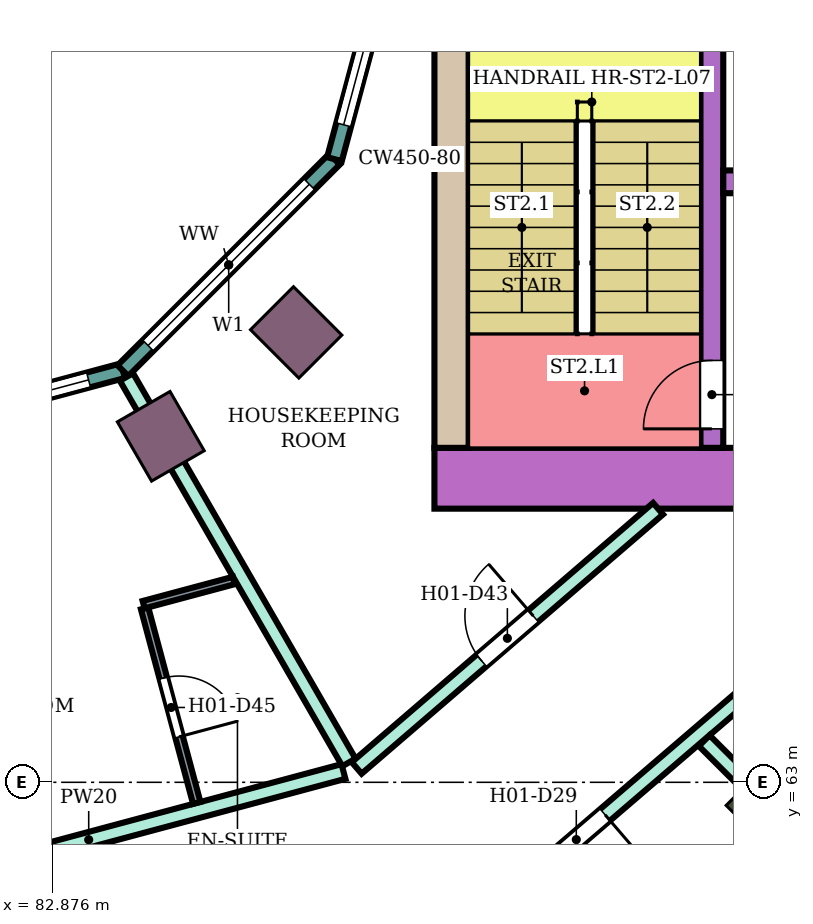
"""IFC4 building model, lengths in metres.
Left out: names, types, materials, properties, quantities, classifications, styles, units other than length and angle.
Written with IfcOpenShell. Run it as: python <this file> out.ifc"""

import sys

from ifc_helpers import new_model, si_unit, direction, frame, frame_2d, origin, origin_2d, place, context, subcontext, project, spatial, rectangle, extrude, element, fill, save


model = new_model("IFC4")
c1 = context("Model", 3, precision=1e-05, world=origin(), true_north=direction((0.0, 1.0)))
c2 = subcontext(c1, "Body", "Model", "MODEL_VIEW")
j1 = project(units=[si_unit("LENGTHUNIT", "METRE"), si_unit("PLANEANGLEUNIT", "RADIAN")], contexts=[c1])
p1 = place(None, origin())
s1 = spatial("IfcSite", under=j1, at=p1, CompositionType="ELEMENT")
p2 = place(p1, origin())
s2 = spatial("IfcBuilding", under=s1, at=p2, CompositionType="ELEMENT")
p3 = place(p2, frame((0.0, 0.0, 36.4)))
s3 = spatial("IfcBuildingStorey", under=s2, at=p3, CompositionType="ELEMENT", Elevation=36.4)
p4 = place(p3, frame((92.445, 62.555, 0.0), z_axis=(0.0, 0.0, 1.0), x_axis=(0.707106781187, -0.707106781187, 0.0)))
e1 = element("IfcColumn", 1, at=p4, inside=s3, PredefinedType="COLUMN", context=c2, shape_type="SweptSolid", body=[
    extrude(rectangle(XDim=1.2, YDim=0.8, at=origin_2d()), origin(), (0.0, 0.0, 1.0), 3.8),
])
for number, where, z_axis, x_axis in (
    (2, (84.3, 67.552, 0.0), (0.0, 0.0, 1.0), (0.5, -0.866, 0.0)),
    (3, (86.081, 68.919, 0.0), (0.0, 0.0, 1.0), (0.707, -0.707, 0.0)),
):
    element("IfcColumn", number, at=place(p3, frame(where, z_axis=z_axis, x_axis=x_axis)), inside=s3, PredefinedType="COLUMN", context=c2, shape_type="SweptSolid", body=[
        extrude(rectangle(XDim=0.9, YDim=0.8, at=origin_2d()), origin(), (0.0, 0.0, 1.0), 3.8),
    ])
p5 = place(p3, frame((87.9, 67.0, 0.0), z_axis=(0.0, 0.0, 1.0), x_axis=(1.0, 0.0, 0.0)))
e4 = element("IfcWall", 4, at=p5, inside=s3, PredefinedType="SHEAR", context=c2, shape_type="SweptSolid", body=[
    extrude(rectangle(XDim=14.7, YDim=0.8, at=frame_2d((7.35, 0.0))), origin(), (0.0, 0.0, 1.0), 3.48),
])
p6 = place(p5, frame((4.2, 0.0, 0.0)))
e5 = element("IfcOpeningElement", 5, at=p6, cuts=e4, PredefinedType="OPENING", context=c2, shape_type="SweptSolid", body=[
    extrude(rectangle(XDim=2.4, YDim=2.4, at=frame_2d((1.2, 1.2))), frame((0.0, 0.41, 0.0), z_axis=(0.0, -1.0, 0.0), x_axis=(1.0, 0.0, 0.0)), (0.0, 0.0, 1.0), 0.82),
])
p7 = place(p3, frame((88.125, 67.4, 0.0), z_axis=(0.0, 0.0, 1.0), x_axis=(0.0, 1.0, 0.0)))
e6 = element("IfcWall", 6, at=p7, inside=s3, PredefinedType="SHEAR", context=c2, shape_type="SweptSolid", body=[
    extrude(rectangle(XDim=7.6, YDim=0.45, at=frame_2d((3.8, 0.0))), origin(), (0.0, 0.0, 1.0), 3.48),
])
p8 = place(p3, frame((91.55, 67.4, 0.0), z_axis=(0.0, 0.0, 1.0), x_axis=(0.0, 1.0, 0.0)))
e7 = element("IfcWall", 7, at=p8, inside=s3, PredefinedType="SHEAR", context=c2, shape_type="SweptSolid", body=[
    extrude(rectangle(XDim=7.6, YDim=0.3, at=frame_2d((3.8, 0.0))), origin(), (0.0, 0.0, 1.0), 3.48),
])
p9 = place(p8, frame((0.25, 0.0, 0.0)))
e8 = element("IfcOpeningElement", 8, at=p9, cuts=e7, PredefinedType="OPENING", context=c2, shape_type="SweptSolid", body=[
    extrude(rectangle(XDim=0.9, YDim=2.1, at=frame_2d((0.45, 1.05))), frame((0.0, 0.16, 0.0), z_axis=(0.0, -1.0, 0.0), x_axis=(1.0, 0.0, 0.0)), (0.0, 0.0, 1.0), 0.32),
])
p10 = place(p3, frame((91.7, 70.9, 0.0), z_axis=(0.0, 0.0, 1.0), x_axis=(1.0, 0.0, 0.0)))
e9 = element("IfcWall", 9, at=p10, inside=s3, PredefinedType="SHEAR", context=c2, shape_type="SweptSolid", body=[
    extrude(rectangle(XDim=10.9, YDim=0.3, at=frame_2d((5.45, 0.0))), origin(), (0.0, 0.0, 1.0), 3.48),
])
p11 = place(p10, frame((0.4, 0.0, 0.0)))
e10 = element("IfcOpeningElement", 10, at=p11, cuts=e9, PredefinedType="OPENING", context=c2, shape_type="SweptSolid", body=[
    extrude(rectangle(XDim=1.4, YDim=2.1, at=frame_2d((0.7, 1.05))), frame((0.0, 0.16, 0.0), z_axis=(0.0, -1.0, 0.0), x_axis=(1.0, 0.0, 0.0)), (0.0, 0.0, 1.0), 0.32),
])
p12 = place(p10, frame((5.4, 0.0, 0.0)))
e11 = element("IfcOpeningElement", 11, at=p12, cuts=e9, PredefinedType="OPENING", context=c2, shape_type="SweptSolid", body=[
    extrude(rectangle(XDim=1.4, YDim=2.1, at=frame_2d((0.7, 1.05))), frame((0.0, 0.16, 0.0), z_axis=(0.0, -1.0, 0.0), x_axis=(1.0, 0.0, 0.0)), (0.0, 0.0, 1.0), 0.32),
])
p13 = place(p10, frame((8.1, 0.0, 0.0)))
e12 = element("IfcOpeningElement", 12, at=p13, cuts=e9, PredefinedType="OPENING", context=c2, shape_type="SweptSolid", body=[
    extrude(rectangle(XDim=1.0, YDim=2.1, at=frame_2d((0.5, 1.05))), frame((0.0, 0.16, 0.0), z_axis=(0.0, -1.0, 0.0), x_axis=(1.0, 0.0, 0.0)), (0.0, 0.0, 1.0), 0.32),
])
p14 = place(p3, frame((80.0, 67.396, 0.0), z_axis=(0.0, 0.0, 1.0), x_axis=(0.965933654434, 0.258789828301, 0.0)))
e13 = element("IfcWall", 13, at=p14, inside=s3, PredefinedType="NOTDEFINED", context=c2, shape_type="SweptSolid", body=[
    extrude(rectangle(XDim=3.936, YDim=0.2, at=frame_2d((1.968, 0.0))), origin(), (0.0, 0.0, 1.0), 3.8),
])
p15 = place(p14, frame((0.468, 0.0, 0.9)))
e14 = element("IfcOpeningElement", 14, at=p15, cuts=e13, PredefinedType="OPENING", context=c2, shape_type="SweptSolid", body=[
    extrude(rectangle(XDim=3.0, YDim=2.3, at=frame_2d((1.5, 1.15))), frame((0.0, 0.11, 0.0), z_axis=(0.0, -1.0, 0.0), x_axis=(1.0, 0.0, 0.0)), (0.0, 0.0, 1.0), 0.22),
])
p16 = place(p3, frame((83.802, 68.415, 0.0), z_axis=(0.0, 0.0, 1.0), x_axis=(0.707106781187, 0.707106781187, 0.0)))
e15 = element("IfcWall", 15, at=p16, inside=s3, PredefinedType="NOTDEFINED", context=c2, shape_type="SweptSolid", body=[
    extrude(rectangle(XDim=3.936, YDim=0.2, at=frame_2d((1.968, 0.0))), origin(), (0.0, 0.0, 1.0), 3.8),
])
p17 = place(p16, frame((0.468, 0.0, 0.9)))
e16 = element("IfcOpeningElement", 16, at=p17, cuts=e15, PredefinedType="OPENING", context=c2, shape_type="SweptSolid", body=[
    extrude(rectangle(XDim=3.0, YDim=2.3, at=frame_2d((1.5, 1.15))), frame((0.0, 0.11, 0.0), z_axis=(0.0, -1.0, 0.0), x_axis=(1.0, 0.0, 0.0)), (0.0, 0.0, 1.0), 0.22),
])
p18 = place(p3, frame((86.585, 71.198, 0.0), z_axis=(0.0, 0.0, 1.0), x_axis=(0.258789828301, 0.965933654434, 0.0)))
e17 = element("IfcWall", 17, at=p18, inside=s3, PredefinedType="NOTDEFINED", context=c2, shape_type="SweptSolid", body=[
    extrude(rectangle(XDim=3.936, YDim=0.2, at=frame_2d((1.968, 0.0))), origin(), (0.0, 0.0, 1.0), 3.8),
])
p19 = place(p18, frame((0.468, 0.0, 0.9)))
e18 = element("IfcOpeningElement", 18, at=p19, cuts=e17, PredefinedType="OPENING", context=c2, shape_type="SweptSolid", body=[
    extrude(rectangle(XDim=3.0, YDim=2.3, at=frame_2d((1.5, 1.15))), frame((0.0, 0.11, 0.0), z_axis=(0.0, -1.0, 0.0), x_axis=(1.0, 0.0, 0.0)), (0.0, 0.0, 1.0), 0.22),
])
p20 = place(p3, frame((80.0, 61.346, 0.0), z_axis=(0.0, 0.0, 1.0), x_axis=(0.965924181808, 0.258825182312, 0.0)))
e19 = element("IfcWall", 19, at=p20, inside=s3, PredefinedType="PARTITIONING", context=c2, shape_type="SweptSolid", body=[
    extrude(rectangle(XDim=6.94, YDim=0.2, at=frame_2d((3.47, 0.0))), origin(), (0.0, 0.0, 1.0), 3.35),
])
p21 = place(p20, frame((0.55, 0.0, 0.0)))
e20 = element("IfcOpeningElement", 20, at=p21, cuts=e19, PredefinedType="OPENING", context=c2, shape_type="SweptSolid", body=[
    extrude(rectangle(XDim=1.0, YDim=2.1, at=frame_2d((0.5, 1.05))), frame((0.0, 0.11, 0.0), z_axis=(0.0, -1.0, 0.0), x_axis=(1.0, 0.0, 0.0)), (0.0, 0.0, 1.0), 0.22),
])
p22 = place(p3, frame((83.848, 68.333, 0.0), z_axis=(0.0, 0.0, 1.0), x_axis=(0.499951054106, -0.866053660865, 0.0)))
e21 = element("IfcWall", 21, at=p22, inside=s3, PredefinedType="PARTITIONING", context=c2, shape_type="SweptSolid", body=[
    extrude(rectangle(XDim=5.855, YDim=0.2, at=frame_2d((2.927, 0.0))), origin(), (0.0, 0.0, 1.0), 3.35),
])
p23 = place(p3, frame((86.877, 63.189, 0.0), z_axis=(0.0, 0.0, 1.0), x_axis=(0.758075808328, 0.652166442581, 0.0)))
e22 = element("IfcWall", 22, at=p23, inside=s3, PredefinedType="PARTITIONING", context=c2, shape_type="SweptSolid", body=[
    extrude(rectangle(XDim=5.23, YDim=0.2, at=frame_2d((2.615, 0.0))), origin(), (0.0, 0.0, 1.0), 3.35),
])
p24 = place(p23, frame((2.165, 0.0, 0.0)))
e23 = element("IfcOpeningElement", 23, at=p24, cuts=e22, PredefinedType="OPENING", context=c2, shape_type="SweptSolid", body=[
    extrude(rectangle(XDim=0.9, YDim=2.1, at=frame_2d((0.45, 1.05))), frame((0.0, 0.11, 0.0), z_axis=(0.0, -1.0, 0.0), x_axis=(1.0, 0.0, 0.0)), (0.0, 0.0, 1.0), 0.22),
])
p25 = place(p3, frame((88.235, 60.931, 0.0), z_axis=(0.0, 0.0, 1.0), x_axis=(0.758799498714, 0.651324282329, 0.0)))
e24 = element("IfcWall", 24, at=p25, inside=s3, PredefinedType="PARTITIONING", context=c2, shape_type="SweptSolid", body=[
    extrude(rectangle(XDim=6.186, YDim=0.2, at=frame_2d((3.093, 0.0))), origin(), (0.0, 0.0, 1.0), 3.35),
])
p26 = place(p25, frame((1.519, 0.0, 0.0)))
e25 = element("IfcOpeningElement", 25, at=p26, cuts=e24, PredefinedType="OPENING", context=c2, shape_type="SweptSolid", body=[
    extrude(rectangle(XDim=1.0, YDim=2.1, at=frame_2d((0.5, 1.05))), frame((0.0, 0.11, 0.0), z_axis=(0.0, -1.0, 0.0), x_axis=(1.0, 0.0, 0.0)), (0.0, 0.0, 1.0), 0.22),
])
p27 = place(p3, frame((91.449, 63.548, 0.0), z_axis=(0.0, 0.0, 1.0), x_axis=(0.706984804638, -0.707228736698, 0.0)))
e26 = element("IfcWall", 26, at=p27, inside=s3, PredefinedType="PARTITIONING", context=c2, shape_type="SweptSolid", body=[
    extrude(rectangle(XDim=7.006, YDim=0.2, at=frame_2d((3.503, 0.0))), origin(), (0.0, 0.0, 1.0), 3.35),
])
p28 = place(p3, frame((84.087, 65.289, 0.0), z_axis=(0.0, 0.0, 1.0), x_axis=(0.258929459649, -0.965896234037, 0.0)))
e27 = element("IfcWall", 27, at=p28, inside=s3, PredefinedType="PARTITIONING", context=c2, shape_type="SweptSolid", body=[
    extrude(rectangle(XDim=2.65, YDim=0.1, at=frame_2d((1.325, 0.0))), origin(), (0.0, 0.0, 1.0), 3.35),
])
p29 = place(p28, frame((0.95, 0.0, 0.0)))
e28 = element("IfcOpeningElement", 28, at=p29, cuts=e27, PredefinedType="OPENING", context=c2, shape_type="SweptSolid", body=[
    extrude(rectangle(XDim=0.8, YDim=2.1, at=frame_2d((0.4, 1.05))), frame((0.0, 0.06, 0.0), z_axis=(0.0, -1.0, 0.0), x_axis=(1.0, 0.0, 0.0)), (0.0, 0.0, 1.0), 0.12),
])
p30 = place(p3, frame((84.074, 65.337, 0.0), z_axis=(0.0, 0.0, 1.0), x_axis=(0.965914351064, 0.258861867428, 0.0)))
e29 = element("IfcWall", 29, at=p30, inside=s3, PredefinedType="PARTITIONING", context=c2, shape_type="SweptSolid", body=[
    extrude(rectangle(XDim=1.229, YDim=0.1, at=frame_2d((0.615, 0.0))), origin(), (0.0, 0.0, 1.0), 3.35),
])
p31 = place(p15, origin())
e30 = element("IfcWindow", 30, at=p31, inside=s3, PartitioningType="SINGLE_PANEL", PredefinedType="WINDOW", context=c2, shape_type="SweptSolid", body=[
    extrude(rectangle(XDim=3.0, YDim=2.3, at=frame_2d((1.5, 1.15))), frame((0.0, 0.03, 0.0), z_axis=(0.0, -1.0, 0.0), x_axis=(1.0, 0.0, 0.0)), (0.0, 0.0, 1.0), 0.06),
])
fill(e14, e30)
p32 = place(p17, origin())
e31 = element("IfcWindow", 31, at=p32, inside=s3, PartitioningType="SINGLE_PANEL", PredefinedType="WINDOW", context=c2, shape_type="SweptSolid", body=[
    extrude(rectangle(XDim=3.0, YDim=2.3, at=frame_2d((1.5, 1.15))), frame((0.0, 0.03, 0.0), z_axis=(0.0, -1.0, 0.0), x_axis=(1.0, 0.0, 0.0)), (0.0, 0.0, 1.0), 0.06),
])
fill(e16, e31)
p33 = place(p19, origin())
e32 = element("IfcWindow", 32, at=p33, inside=s3, PartitioningType="SINGLE_PANEL", PredefinedType="WINDOW", context=c2, shape_type="SweptSolid", body=[
    extrude(rectangle(XDim=3.0, YDim=2.3, at=frame_2d((1.5, 1.15))), frame((0.0, 0.03, 0.0), z_axis=(0.0, -1.0, 0.0), x_axis=(1.0, 0.0, 0.0)), (0.0, 0.0, 1.0), 0.06),
])
fill(e18, e32)
p34 = place(p26, frame((1.0, 0.0, 0.0), z_axis=(0.0, 0.0, 1.0), x_axis=(-1.0, 0.0, 0.0)))
e33 = element("IfcDoor", 33, at=p34, inside=s3, OperationType="SINGLE_SWING_LEFT", PredefinedType="DOOR", context=c2, shape_type="SweptSolid", body=[
    extrude(rectangle(XDim=1.0, YDim=2.1, at=frame_2d((0.5, 1.05))), frame((0.0, 0.025, 0.0), z_axis=(0.0, -1.0, 0.0), x_axis=(1.0, 0.0, 0.0)), (0.0, 0.0, 1.0), 0.05),
])
fill(e25, e33)
p35 = place(p24, origin())
e34 = element("IfcDoor", 34, at=p35, inside=s3, OperationType="SINGLE_SWING_RIGHT", PredefinedType="DOOR", context=c2, shape_type="SweptSolid", body=[
    extrude(rectangle(XDim=0.9, YDim=2.1, at=frame_2d((0.45, 1.05))), frame((0.0, 0.025, 0.0), z_axis=(0.0, -1.0, 0.0), x_axis=(1.0, 0.0, 0.0)), (0.0, 0.0, 1.0), 0.05),
])
fill(e23, e34)
p36 = place(p29, origin())
e35 = element("IfcDoor", 35, at=p36, inside=s3, OperationType="SINGLE_SWING_RIGHT", PredefinedType="DOOR", context=c2, shape_type="SweptSolid", body=[
    extrude(rectangle(XDim=0.8, YDim=2.1, at=frame_2d((0.4, 1.05))), frame((0.0, 0.025, 0.0), z_axis=(0.0, -1.0, 0.0), x_axis=(1.0, 0.0, 0.0)), (0.0, 0.0, 1.0), 0.05),
])
fill(e28, e35)
p37 = place(p9, origin())
e36 = element("IfcDoor", 36, at=p37, inside=s3, OperationType="SINGLE_SWING_LEFT", PredefinedType="DOOR", context=c2, shape_type="SweptSolid", body=[
    extrude(rectangle(XDim=0.9, YDim=2.1, at=frame_2d((0.45, 1.05))), frame((0.0, 0.025, 0.0), z_axis=(0.0, -1.0, 0.0), x_axis=(1.0, 0.0, 0.0)), (0.0, 0.0, 1.0), 0.05),
])
fill(e8, e36)
save(model, sys.argv[1])
